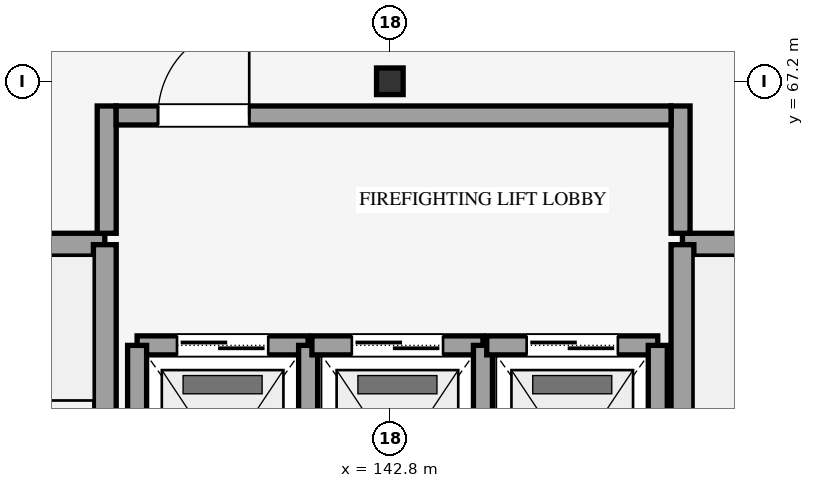
"""IFC4 building model, lengths in metres.
Left out: names, types, materials, properties, quantities, classifications, styles, units other than length and angle.
Written with IfcOpenShell. Run it as: python <this file> out.ifc"""

import sys

from ifc_helpers import new_model, si_unit, direction, frame, frame_2d, origin, origin_2d, place, context, subcontext, project, spatial, rectangle, i_section, extrude, element, fill, save


model = new_model("IFC4")
c1 = context("Model", 3, precision=1e-05, world=origin(), true_north=direction((0.0, 1.0)))
c2 = subcontext(c1, "Body", "Model", "MODEL_VIEW")
j1 = project(units=[si_unit("LENGTHUNIT", "METRE"), si_unit("PLANEANGLEUNIT", "RADIAN")], contexts=[c1])
p1 = place(None, origin())
s1 = spatial("IfcSite", under=j1, at=p1, CompositionType="ELEMENT")
p2 = place(p1, origin())
s2 = spatial("IfcBuilding", under=s1, at=p2, CompositionType="ELEMENT")
p3 = place(p2, frame((0.0, 0.0, 40.5)))
s3 = spatial("IfcBuildingStorey", under=s2, at=p3, CompositionType="ELEMENT", Elevation=40.5)
p4 = place(p3, frame((142.8, 67.2, 0.0), z_axis=(0.0, 0.0, 1.0), x_axis=(1.0, 0.0, 0.0)))
e1 = element("IfcColumn", 1, at=p4, inside=s3, PredefinedType="COLUMN", context=c2, shape_type="SweptSolid", body=[
    extrude(i_section(OverallWidth=0.35, OverallDepth=0.35, WebThickness=0.012, FlangeThickness=0.019, FilletRadius=0.02, at=origin_2d()), origin(), (0.0, 0.0, 1.0), 4.2),
])
p5 = place(p3, frame((135.05, 65.05, 0.0), z_axis=(0.0, 0.0, 1.0), x_axis=(1.0, 0.0, 0.0)))
e2 = element("IfcWall", 2, at=p5, inside=s3, PredefinedType="SHEAR", context=c2, shape_type="SweptSolid", body=[
    extrude(rectangle(XDim=4.0, YDim=0.3, at=frame_2d((2.0, 0.0))), origin(), (0.0, 0.0, 1.0), 4.2),
])
p6 = place(p3, frame((139.05, 50.75, 0.0), z_axis=(0.0, 0.0, 1.0), x_axis=(0.0, 1.0, 0.0)))
e3 = element("IfcWall", 3, at=p6, inside=s3, PredefinedType="SHEAR", context=c2, shape_type="SweptSolid", body=[
    extrude(rectangle(XDim=14.3, YDim=0.3, at=frame_2d((7.15, 0.0))), origin(), (0.0, 0.0, 1.0), 4.2),
])
p7 = place(p3, frame((146.65, 65.05, 0.0), z_axis=(0.0, 0.0, 1.0), x_axis=(1.0, 0.0, 0.0)))
e4 = element("IfcWall", 4, at=p7, inside=s3, PredefinedType="SHEAR", context=c2, shape_type="SweptSolid", body=[
    extrude(rectangle(XDim=4.0, YDim=0.3, at=frame_2d((2.0, 0.0))), origin(), (0.0, 0.0, 1.0), 4.2),
])
p8 = place(p3, frame((146.65, 50.75, 0.0), z_axis=(0.0, 0.0, 1.0), x_axis=(0.0, 1.0, 0.0)))
e5 = element("IfcWall", 5, at=p8, inside=s3, PredefinedType="SHEAR", context=c2, shape_type="SweptSolid", body=[
    extrude(rectangle(XDim=14.3, YDim=0.3, at=frame_2d((7.15, 0.0))), origin(), (0.0, 0.0, 1.0), 4.2),
])
p9 = place(p3, frame((139.475, 63.725, 0.0), z_axis=(0.0, 0.0, 1.0), x_axis=(1.0, 0.0, 0.0)))
e6 = element("IfcWall", 6, at=p9, inside=s3, PredefinedType="SHEAR", context=c2, shape_type="SweptSolid", body=[
    extrude(rectangle(XDim=2.25, YDim=0.25, at=frame_2d((1.125, 0.0))), origin(), (0.0, 0.0, 1.0), 3.96),
])
p10 = place(p9, frame((0.525, 0.0, 0.0)))
e7 = element("IfcOpeningElement", 7, at=p10, cuts=e6, PredefinedType="OPENING", context=c2, shape_type="SweptSolid", body=[
    extrude(rectangle(XDim=1.2, YDim=2.18, at=frame_2d((0.6, 1.09))), frame((0.0, 0.135, 0.0), z_axis=(0.0, -1.0, 0.0), x_axis=(1.0, 0.0, 0.0)), (0.0, 0.0, 1.0), 0.27),
])
for number, where, z_axis, x_axis in (
    (8, (139.475, 60.675, 0.0), (0.0, 0.0, 1.0), (0.0, 1.0, 0.0)),
    (9, (141.725, 60.675, 0.0), (0.0, 0.0, 1.0), (0.0, 1.0, 0.0)),
):
    element("IfcWall", number, at=place(p3, frame(where, z_axis=z_axis, x_axis=x_axis)), inside=s3, PredefinedType="SHEAR", context=c2, shape_type="SweptSolid", body=[
        extrude(rectangle(XDim=3.05, YDim=0.25, at=frame_2d((1.525, 0.0))), origin(), (0.0, 0.0, 1.0), 3.96),
    ])
p11 = place(p3, frame((141.775, 63.725, 0.0), z_axis=(0.0, 0.0, 1.0), x_axis=(1.0, 0.0, 0.0)))
e10 = element("IfcWall", 10, at=p11, inside=s3, PredefinedType="SHEAR", context=c2, shape_type="SweptSolid", body=[
    extrude(rectangle(XDim=2.25, YDim=0.25, at=frame_2d((1.125, 0.0))), origin(), (0.0, 0.0, 1.0), 3.96),
])
p12 = place(p11, frame((0.525, 0.0, 0.0)))
e11 = element("IfcOpeningElement", 11, at=p12, cuts=e10, PredefinedType="OPENING", context=c2, shape_type="SweptSolid", body=[
    extrude(rectangle(XDim=1.2, YDim=2.18, at=frame_2d((0.6, 1.09))), frame((0.0, 0.135, 0.0), z_axis=(0.0, -1.0, 0.0), x_axis=(1.0, 0.0, 0.0)), (0.0, 0.0, 1.0), 0.27),
])
p13 = place(p3, frame((144.025, 60.675, 0.0), z_axis=(0.0, 0.0, 1.0), x_axis=(0.0, 1.0, 0.0)))
e12 = element("IfcWall", 12, at=p13, inside=s3, PredefinedType="SHEAR", context=c2, shape_type="SweptSolid", body=[
    extrude(rectangle(XDim=3.05, YDim=0.25, at=frame_2d((1.525, 0.0))), origin(), (0.0, 0.0, 1.0), 3.96),
])
p14 = place(p3, frame((144.075, 63.725, 0.0), z_axis=(0.0, 0.0, 1.0), x_axis=(1.0, 0.0, 0.0)))
e13 = element("IfcWall", 13, at=p14, inside=s3, PredefinedType="SHEAR", context=c2, shape_type="SweptSolid", body=[
    extrude(rectangle(XDim=2.25, YDim=0.25, at=frame_2d((1.125, 0.0))), origin(), (0.0, 0.0, 1.0), 3.96),
])
p15 = place(p14, frame((0.525, 0.0, 0.0)))
e14 = element("IfcOpeningElement", 14, at=p15, cuts=e13, PredefinedType="OPENING", context=c2, shape_type="SweptSolid", body=[
    extrude(rectangle(XDim=1.2, YDim=2.18, at=frame_2d((0.6, 1.09))), frame((0.0, 0.135, 0.0), z_axis=(0.0, -1.0, 0.0), x_axis=(1.0, 0.0, 0.0)), (0.0, 0.0, 1.0), 0.27),
])
p16 = place(p3, frame((146.325, 60.675, 0.0), z_axis=(0.0, 0.0, 1.0), x_axis=(0.0, 1.0, 0.0)))
e15 = element("IfcWall", 15, at=p16, inside=s3, PredefinedType="SHEAR", context=c2, shape_type="SweptSolid", body=[
    extrude(rectangle(XDim=3.05, YDim=0.25, at=frame_2d((1.525, 0.0))), origin(), (0.0, 0.0, 1.0), 3.96),
])
for number, where, z_axis, x_axis in (
    (16, (139.075, 65.2, 0.0), (0.0, 0.0, 1.0), (0.0, 1.0, 0.0)),
    (17, (146.625, 65.2, 0.0), (0.0, 0.0, 1.0), (0.0, 1.0, 0.0)),
):
    element("IfcWall", number, at=place(p3, frame(where, z_axis=z_axis, x_axis=x_axis)), inside=s3, PredefinedType="SHEAR", context=c2, shape_type="SweptSolid", body=[
        extrude(rectangle(XDim=1.675, YDim=0.25, at=frame_2d((0.837, 0.0))), origin(), (0.0, 0.0, 1.0), 3.96),
    ])
p17 = place(p3, frame((139.2, 66.75, 0.0), z_axis=(0.0, 0.0, 1.0), x_axis=(1.0, 0.0, 0.0)))
e18 = element("IfcWall", 18, at=p17, inside=s3, PredefinedType="SHEAR", context=c2, shape_type="SweptSolid", body=[
    extrude(rectangle(XDim=7.3, YDim=0.25, at=frame_2d((3.65, 0.0))), origin(), (0.0, 0.0, 1.0), 3.96),
])
p18 = place(p17, frame((0.55, 0.0, 0.0)))
e19 = element("IfcOpeningElement", 19, at=p18, cuts=e18, PredefinedType="OPENING", context=c2, shape_type="SweptSolid", body=[
    extrude(rectangle(XDim=1.2, YDim=2.15, at=frame_2d((0.6, 1.075))), frame((0.0, 0.135, 0.0), z_axis=(0.0, -1.0, 0.0), x_axis=(1.0, 0.0, 0.0)), (0.0, 0.0, 1.0), 0.27),
])
p19 = place(p10, origin())
e20 = element("IfcDoor", 20, at=p19, inside=s3, OperationType="DOUBLE_DOOR_SLIDING", PredefinedType="DOOR", context=c2, shape_type="SweptSolid", body=[
    extrude(rectangle(XDim=1.2, YDim=2.18, at=frame_2d((0.6, 1.09))), frame((0.0, 0.025, 0.0), z_axis=(0.0, -1.0, 0.0), x_axis=(1.0, 0.0, 0.0)), (0.0, 0.0, 1.0), 0.05),
])
fill(e7, e20)
p20 = place(p12, origin())
e21 = element("IfcDoor", 21, at=p20, inside=s3, OperationType="DOUBLE_DOOR_SLIDING", PredefinedType="DOOR", context=c2, shape_type="SweptSolid", body=[
    extrude(rectangle(XDim=1.2, YDim=2.18, at=frame_2d((0.6, 1.09))), frame((0.0, 0.025, 0.0), z_axis=(0.0, -1.0, 0.0), x_axis=(1.0, 0.0, 0.0)), (0.0, 0.0, 1.0), 0.05),
])
fill(e11, e21)
p21 = place(p15, origin())
e22 = element("IfcDoor", 22, at=p21, inside=s3, OperationType="DOUBLE_DOOR_SLIDING", PredefinedType="DOOR", context=c2, shape_type="SweptSolid", body=[
    extrude(rectangle(XDim=1.2, YDim=2.18, at=frame_2d((0.6, 1.09))), frame((0.0, 0.025, 0.0), z_axis=(0.0, -1.0, 0.0), x_axis=(1.0, 0.0, 0.0)), (0.0, 0.0, 1.0), 0.05),
])
fill(e14, e22)
p22 = place(p18, origin())
e23 = element("IfcDoor", 23, at=p22, inside=s3, OperationType="SINGLE_SWING_RIGHT", PredefinedType="DOOR", context=c2, shape_type="SweptSolid", body=[
    extrude(rectangle(XDim=1.2, YDim=2.15, at=frame_2d((0.6, 1.075))), frame((0.0, 0.025, 0.0), z_axis=(0.0, -1.0, 0.0), x_axis=(1.0, 0.0, 0.0)), (0.0, 0.0, 1.0), 0.05),
])
fill(e19, e23)
save(model, sys.argv[1])
